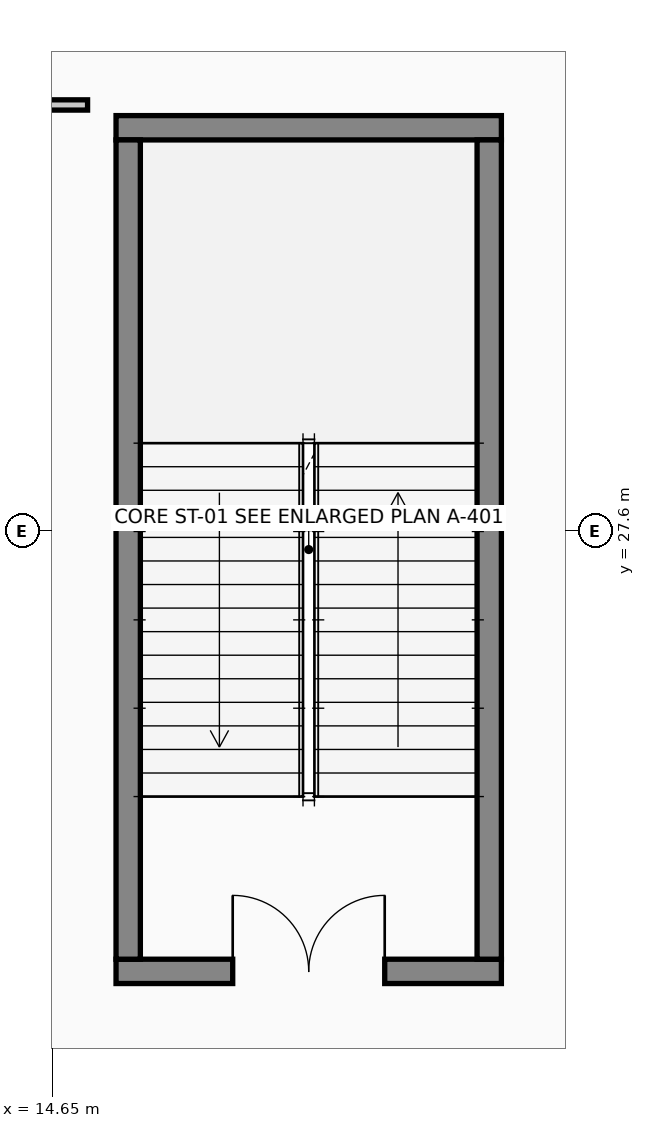
"""IFC4 building model, lengths in metres.
Left out: names, types, materials, properties, quantities, classifications, styles, units other than length and angle.
Written with IfcOpenShell. Run it as: python <this file> out.ifc"""

import sys

from ifc_helpers import new_model, si_unit, direction, frame, frame_2d, origin, place, context, subcontext, project, spatial, rectangle, extrude, element, fill, save


model = new_model("IFC4")
c1 = context("Model", 3, precision=1e-05, world=origin(), true_north=direction((0.0, 1.0)))
c2 = subcontext(c1, "Body", "Model", "MODEL_VIEW")
j1 = project(units=[si_unit("LENGTHUNIT", "METRE"), si_unit("PLANEANGLEUNIT", "RADIAN")], contexts=[c1])
p1 = place(None, origin())
s1 = spatial("IfcSite", under=j1, at=p1, CompositionType="ELEMENT")
p2 = place(p1, origin())
s2 = spatial("IfcBuilding", under=s1, at=p2, CompositionType="ELEMENT")
p3 = place(p2, frame((0.0, 0.0, 9.6)))
s3 = spatial("IfcBuildingStorey", under=s2, at=p3, CompositionType="ELEMENT", Elevation=9.6)
p4 = place(p3, frame((15.49, 21.8, 0.0), z_axis=(0.0, 0.0, 1.0), x_axis=(1.0, 0.0, 0.0)))
e1 = element("IfcWall", 1, at=p4, inside=s3, PredefinedType="SHEAR", context=c2, shape_type="SweptSolid", body=[
    extrude(rectangle(XDim=5.07, YDim=0.32, at=frame_2d((2.535, 0.0))), origin(), (0.0, 0.0, 1.0), 4.56),
])
p5 = place(p4, frame((1.535, 0.0, 0.0)))
e2 = element("IfcOpeningElement", 2, at=p5, cuts=e1, PredefinedType="OPENING", context=c2, shape_type="SweptSolid", body=[
    extrude(rectangle(XDim=2.0, YDim=2.15, at=frame_2d((1.0, 1.075))), frame((0.0, 0.17, 0.0), z_axis=(0.0, -1.0, 0.0), x_axis=(1.0, 0.0, 0.0)), (0.0, 0.0, 1.0), 0.34),
])
p6 = place(p3, frame((15.49, 32.9, 0.0), z_axis=(0.0, 0.0, 1.0), x_axis=(1.0, 0.0, 0.0)))
e3 = element("IfcWall", 3, at=p6, inside=s3, PredefinedType="SHEAR", context=c2, shape_type="SweptSolid", body=[
    extrude(rectangle(XDim=5.07, YDim=0.32, at=frame_2d((2.535, 0.0))), origin(), (0.0, 0.0, 1.0), 4.56),
])
for number, where, z_axis, x_axis in (
    (4, (15.65, 21.96, 0.0), (0.0, 0.0, 1.0), (0.0, 1.0, 0.0)),
    (5, (20.4, 21.96, 0.0), (0.0, 0.0, 1.0), (0.0, 1.0, 0.0)),
):
    element("IfcWall", number, at=place(p3, frame(where, z_axis=z_axis, x_axis=x_axis)), inside=s3, PredefinedType="SHEAR", context=c2, shape_type="SweptSolid", body=[
        extrude(rectangle(XDim=10.78, YDim=0.32, at=frame_2d((5.39, 0.0))), origin(), (0.0, 0.0, 1.0), 4.56),
    ])
p7 = place(p3, frame((0.82, 33.2, 0.0), z_axis=(0.0, 0.0, 1.0), x_axis=(1.0, 0.0, 0.0)))
e6 = element("IfcWall", 6, at=p7, inside=s3, PredefinedType="PARTITIONING", context=c2, shape_type="SweptSolid", body=[
    extrude(rectangle(XDim=14.295, YDim=0.135, at=frame_2d((7.148, 0.0))), origin(), (0.0, 0.0, 1.0), 4.545),
])
p8 = place(p7, frame((6.648, 0.0, 0.0)))
e7 = element("IfcOpeningElement", 7, at=p8, cuts=e6, PredefinedType="OPENING", context=c2, shape_type="SweptSolid", body=[
    extrude(rectangle(XDim=1.0, YDim=2.1, at=frame_2d((0.5, 1.05))), frame((0.0, 0.077, 0.0), z_axis=(0.0, -1.0, 0.0), x_axis=(1.0, 0.0, 0.0)), (0.0, 0.0, 1.0), 0.155),
])
p9 = place(p5, origin())
e8 = element("IfcDoor", 8, at=p9, inside=s3, OperationType="DOUBLE_DOOR_SINGLE_SWING", PredefinedType="DOOR", context=c2, shape_type="SweptSolid", body=[
    extrude(rectangle(XDim=2.0, YDim=2.15, at=frame_2d((1.0, 1.075))), frame((0.0, 0.025, 0.0), z_axis=(0.0, -1.0, 0.0), x_axis=(1.0, 0.0, 0.0)), (0.0, 0.0, 1.0), 0.05),
])
fill(e2, e8)
save(model, sys.argv[1])
